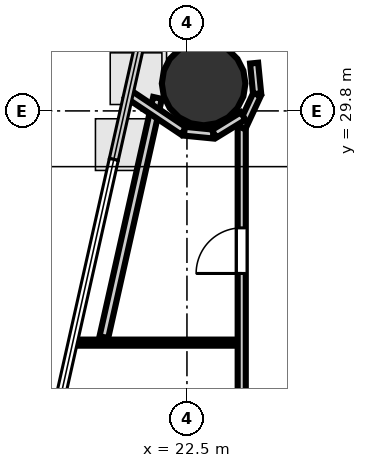
"""IFC4 building model, lengths in metres.
Left out: names, types, materials, properties, quantities, classifications, styles, units other than length and angle.
Written with IfcOpenShell. Run it as: python <this file> out.ifc"""

import sys

from ifc_helpers import new_model, si_unit, direction, frame, frame_2d, origin, origin_2d, place, context, subcontext, project, spatial, rectangle, hollow_circle, extrude, element, fill, save


model = new_model("IFC4")
c1 = context("Model", 3, precision=1e-05, world=origin(), true_north=direction((0.0, 1.0)))
c2 = subcontext(c1, "Body", "Model", "MODEL_VIEW")
j1 = project(units=[si_unit("LENGTHUNIT", "METRE"), si_unit("PLANEANGLEUNIT", "RADIAN")], contexts=[c1])
p1 = place(None, origin())
s1 = spatial("IfcSite", under=j1, at=p1, CompositionType="ELEMENT")
p2 = place(p1, origin())
s2 = spatial("IfcBuilding", under=s1, at=p2, CompositionType="ELEMENT")
p3 = place(p2, frame((0.0, 0.0, 89.5)))
s3 = spatial("IfcBuildingStorey", under=s2, at=p3, CompositionType="ELEMENT", Elevation=89.5)
p4 = place(p3, frame((22.829, 30.34, 0.0), z_axis=(0.0, 0.0, 1.0), x_axis=(1.0, 0.0, 0.0)))
e1 = element("IfcColumn", 1, at=p4, inside=s3, PredefinedType="COLUMN", context=c2, shape_type="SweptSolid", body=[
    extrude(hollow_circle(Radius=0.825, WallThickness=0.04, at=origin_2d()), origin(), (0.0, 0.0, 1.0), 3.7),
])
p5 = place(p3, frame((23.581, 18.15, 0.0), z_axis=(0.0, 0.0, 1.0), x_axis=(0.0, 1.0, 0.0)))
e2 = element("IfcWall", 2, at=p5, inside=s3, PredefinedType="PARTITIONING", context=c2, shape_type="SweptSolid", body=[
    extrude(rectangle(XDim=11.333, YDim=0.16, at=frame_2d((5.667, 0.0))), origin(), (0.0, 0.0, 1.0), 2.678),
])
p6 = place(p5, frame((3.299, 0.0, 0.0)))
e3 = element("IfcOpeningElement", 3, at=p6, cuts=e2, PredefinedType="OPENING", context=c2, shape_type="SweptSolid", body=[
    extrude(rectangle(XDim=1.25, YDim=2.2, at=frame_2d((0.625, 1.1))), frame((0.0, 0.09, 0.0), z_axis=(0.0, -1.0, 0.0), x_axis=(1.0, 0.0, 0.0)), (0.0, 0.0, 1.0), 0.18),
])
p7 = place(p5, frame((8.442, 0.0, 0.0)))
e4 = element("IfcOpeningElement", 4, at=p7, cuts=e2, PredefinedType="OPENING", context=c2, shape_type="SweptSolid", body=[
    extrude(rectangle(XDim=0.9, YDim=2.1, at=frame_2d((0.45, 1.05))), frame((0.0, 0.09, 0.0), z_axis=(0.0, -1.0, 0.0), x_axis=(1.0, 0.0, 0.0)), (0.0, 0.0, 1.0), 0.18),
])
p8 = place(p3, frame((23.578, 29.47, 0.0), z_axis=(0.0, 0.0, 1.0), x_axis=(0.421827918194, 0.906675910914, 0.0)))
e5 = element("IfcWall", 5, at=p8, inside=s3, PredefinedType="PARTITIONING", context=c2, shape_type="SweptSolid", body=[
    extrude(rectangle(XDim=0.72, YDim=0.16, at=frame_2d((0.36, 0.0))), origin(), (0.0, 0.0, 1.0), 2.72),
])
p9 = place(p3, frame((23.885, 30.139, 0.0), z_axis=(0.0, 0.0, 1.0), x_axis=(-0.0981888168, 0.995167803064, 0.0)))
e6 = element("IfcWall", 6, at=p9, inside=s3, PredefinedType="PARTITIONING", context=c2, shape_type="SweptSolid", body=[
    extrude(rectangle(XDim=0.607, YDim=0.16, at=frame_2d((0.303, 0.0))), origin(), (0.0, 0.0, 1.0), 2.72),
])
p10 = place(p3, frame((20.226, 25.227, 0.0), z_axis=(0.0, 0.0, 1.0), x_axis=(1.0, 0.0, 0.0)))
e7 = element("IfcWall", 7, at=p10, inside=s3, PredefinedType="PARTITIONING", context=c2, shape_type="SweptSolid", body=[
    extrude(rectangle(XDim=3.244, YDim=0.12, at=frame_2d((1.622, 0.0))), origin(), (0.0, 0.0, 1.0), 2.678),
])
p11 = place(p3, frame((20.86, 25.335, 0.0), z_axis=(0.0, 0.0, 1.0), x_axis=(0.218848140049, 0.975758931088, 0.0)))
e8 = element("IfcWall", 8, at=p11, inside=s3, PredefinedType="PLUMBINGWALL", context=c2, shape_type="SweptSolid", body=[
    extrude(rectangle(XDim=4.838, YDim=0.175, at=frame_2d((2.419, 0.0))), origin(), (0.0, 0.0, 1.0), 2.72),
])
p12 = place(p3, frame((21.329, 30.143, 0.0), z_axis=(0.0, 0.0, 1.0), x_axis=(0.831400159378, -0.555674162605, 0.0)))
e9 = element("IfcWall", 9, at=p12, inside=s3, PredefinedType="PLUMBINGWALL", context=c2, shape_type="SweptSolid", body=[
    extrude(rectangle(XDim=1.33, YDim=0.175, at=frame_2d((0.665, 0.0))), origin(), (0.0, 0.0, 1.0), 2.72),
])
p13 = place(p3, frame((22.449, 29.399, 0.0), z_axis=(0.0, 0.0, 1.0), x_axis=(0.995167364461, -0.098193262045, 0.0)))
e10 = element("IfcWall", 10, at=p13, inside=s3, PredefinedType="PLUMBINGWALL", context=c2, shape_type="SweptSolid", body=[
    extrude(rectangle(XDim=0.572, YDim=0.175, at=frame_2d((0.286, 0.0))), origin(), (0.0, 0.0, 1.0), 2.678),
])
p14 = place(p3, frame((23.037, 29.347, 0.0), z_axis=(0.0, 0.0, 1.0), x_axis=(0.852045812822, 0.523467222328, 0.0)))
e11 = element("IfcWall", 11, at=p14, inside=s3, PredefinedType="PLUMBINGWALL", context=c2, shape_type="SweptSolid", body=[
    extrude(rectangle(XDim=0.67, YDim=0.175, at=frame_2d((0.335, 0.0))), origin(), (0.0, 0.0, 1.0), 2.678),
])
p15 = place(p7, origin())
e12 = element("IfcDoor", 12, at=p15, inside=s3, OperationType="SINGLE_SWING_LEFT", PredefinedType="DOOR", context=c2, shape_type="SweptSolid", body=[
    extrude(rectangle(XDim=0.9, YDim=2.1, at=frame_2d((0.45, 1.05))), frame((0.0, 0.025, 0.0), z_axis=(0.0, -1.0, 0.0), x_axis=(1.0, 0.0, 0.0)), (0.0, 0.0, 1.0), 0.05),
])
fill(e4, e12)
save(model, sys.argv[1])
